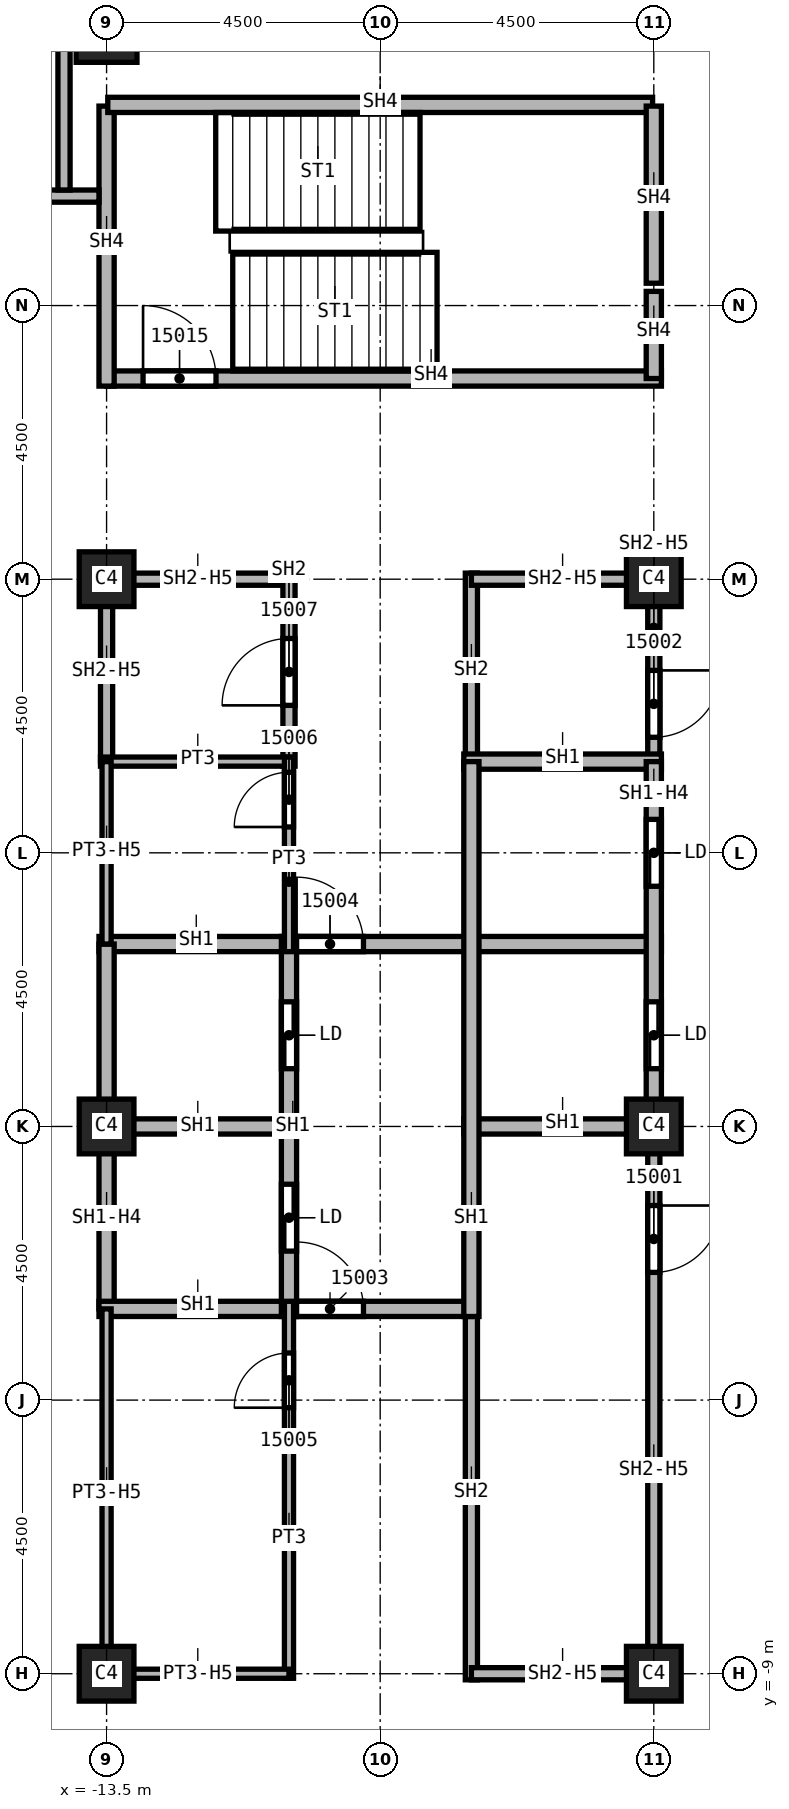
"""IFC4 building model, lengths in metres.
Left out: names, types, materials, properties, quantities, classifications, styles, units other than length and angle.
Written with IfcOpenShell. Run it as: python <this file> out.ifc"""

import sys

from ifc_helpers import new_model, si_unit, direction, frame, frame_2d, origin, origin_2d, place, context, subcontext, project, spatial, rectangle, extrude, element, fill, save


model = new_model("IFC4")
c1 = context("Model", 3, precision=1e-05, world=origin(), true_north=direction((0.0, 1.0)))
c2 = subcontext(c1, "Body", "Model", "MODEL_VIEW")
j1 = project(units=[si_unit("LENGTHUNIT", "METRE"), si_unit("PLANEANGLEUNIT", "RADIAN")], contexts=[c1])
p1 = place(None, origin())
s1 = spatial("IfcSite", under=j1, at=p1, CompositionType="ELEMENT")
p2 = place(p1, origin())
s2 = spatial("IfcBuilding", under=s1, at=p2, CompositionType="ELEMENT")
p3 = place(p2, frame((0.0, 0.0, 228.0)))
s3 = spatial("IfcBuildingStorey", under=s2, at=p3, CompositionType="ELEMENT", Elevation=228.0)
p4 = place(p3, frame((-13.5, 18.0, 0.0), z_axis=(0.0, 0.0, 1.0), x_axis=(1.0, 0.0, 0.0)))
e1 = element("IfcColumn", 1, at=p4, inside=s3, PredefinedType="COLUMN", context=c2, shape_type="SweptSolid", body=[
    extrude(rectangle(XDim=1.0, YDim=1.0, at=origin_2d()), origin(), (0.0, 0.0, 1.0), 3.72),
])
for number, where, z_axis, x_axis in (
    (2, (-4.5, 0.0, 0.0), (0.0, 0.0, 1.0), (1.0, 0.0, 0.0)),
    (3, (-4.5, 9.0, 0.0), (0.0, 0.0, 1.0), (1.0, 0.0, 0.0)),
    (4, (-4.5, -9.0, 0.0), (0.0, 0.0, 1.0), (1.0, 0.0, 0.0)),
    (5, (-13.5, 0.0, 0.0), (0.0, 0.0, 1.0), (1.0, 0.0, 0.0)),
    (6, (-13.5, 9.0, 0.0), (0.0, 0.0, 1.0), (1.0, 0.0, 0.0)),
    (7, (-13.5, -9.0, 0.0), (0.0, 0.0, 1.0), (1.0, 0.0, 0.0)),
):
    element("IfcColumn", number, at=place(p3, frame(where, z_axis=z_axis, x_axis=x_axis)), inside=s3, PredefinedType="COLUMN", context=c2, shape_type="SweptSolid", body=[
        extrude(rectangle(XDim=0.9, YDim=0.9, at=origin_2d()), origin(), (0.0, 0.0, 1.0), 3.72),
    ])
p5 = place(p3, frame((-13.5, 6.0, 0.0), z_axis=(0.0, 0.0, 1.0), x_axis=(0.0, 1.0, 0.0)))
e8 = element("IfcWall", 8, at=p5, inside=s3, PredefinedType="SOLIDWALL", context=c2, shape_type="SweptSolid", body=[
    extrude(rectangle(XDim=3.1, YDim=0.2, at=frame_2d((1.55, 0.0))), origin(), (0.0, 0.0, 1.0), 2.958),
])
p6 = place(p3, frame((-13.5, 9.0, 0.0), z_axis=(0.0, 0.0, 1.0), x_axis=(1.0, 0.0, 0.0)))
e9 = element("IfcWall", 9, at=p6, inside=s3, PredefinedType="SOLIDWALL", context=c2, shape_type="SweptSolid", body=[
    extrude(rectangle(XDim=3.0, YDim=0.2, at=frame_2d((1.5, 0.0))), origin(), (0.0, 0.0, 1.0), 2.958),
])
p7 = place(p3, frame((-10.5, 5.925, 0.0), z_axis=(0.0, 0.0, 1.0), x_axis=(0.0, 1.0, 0.0)))
e10 = element("IfcWall", 10, at=p7, inside=s3, PredefinedType="SOLIDWALL", context=c2, shape_type="SweptSolid", body=[
    extrude(rectangle(XDim=3.175, YDim=0.2, at=frame_2d((1.587, 0.0))), origin(), (0.0, 0.0, 1.0), 3.72),
])
p8 = place(p7, frame((1.0, 0.0, 0.0)))
e11 = element("IfcOpeningElement", 11, at=p8, cuts=e10, PredefinedType="OPENING", context=c2, shape_type="SweptSolid", body=[
    extrude(rectangle(XDim=1.1, YDim=2.1, at=frame_2d((0.55, 1.05))), frame((0.0, 0.1, 0.0), z_axis=(0.0, -1.0, 0.0), x_axis=(1.0, 0.0, 0.0)), (0.0, 0.0, 1.0), 0.2),
])
p9 = place(p3, frame((-7.5, -9.1, 0.0), z_axis=(0.0, 0.0, 1.0), x_axis=(0.0, 1.0, 0.0)))
e12 = element("IfcWall", 12, at=p9, inside=s3, PredefinedType="SOLIDWALL", context=c2, shape_type="SweptSolid", body=[
    extrude(rectangle(XDim=6.225, YDim=0.2, at=frame_2d((3.113, 0.0))), origin(), (0.0, 0.0, 1.0), 3.72),
])
p10 = place(p3, frame((-7.5, 6.0, 0.0), z_axis=(0.0, 0.0, 1.0), x_axis=(0.0, 1.0, 0.0)))
e13 = element("IfcWall", 13, at=p10, inside=s3, PredefinedType="SOLIDWALL", context=c2, shape_type="SweptSolid", body=[
    extrude(rectangle(XDim=3.1, YDim=0.2, at=frame_2d((1.55, 0.0))), origin(), (0.0, 0.0, 1.0), 3.72),
])
for number, where, z_axis, x_axis in (
    (14, (-7.5, 9.0, 0.0), (0.0, 0.0, 1.0), (1.0, 0.0, 0.0)),
    (15, (-4.5, -9.0, 0.0), (0.0, 0.0, 1.0), (-1.0, 0.0, 0.0)),
):
    element("IfcWall", number, at=place(p3, frame(where, z_axis=z_axis, x_axis=x_axis)), inside=s3, PredefinedType="SOLIDWALL", context=c2, shape_type="SweptSolid", body=[
        extrude(rectangle(XDim=3.0, YDim=0.2, at=frame_2d((1.5, 0.0))), origin(), (0.0, 0.0, 1.0), 2.958),
    ])
p11 = place(p3, frame((-4.5, 0.0, 0.0), z_axis=(0.0, 0.0, 1.0), x_axis=(0.0, -1.0, 0.0)))
e16 = element("IfcWall", 16, at=p11, inside=s3, PredefinedType="SOLIDWALL", context=c2, shape_type="SweptSolid", body=[
    extrude(rectangle(XDim=9.1, YDim=0.2, at=frame_2d((4.55, 0.0))), origin(), (0.0, 0.0, 1.0), 2.958),
])
p12 = place(p11, frame((1.3, 0.0, 0.0)))
e17 = element("IfcOpeningElement", 17, at=p12, cuts=e16, PredefinedType="OPENING", context=c2, shape_type="SweptSolid", body=[
    extrude(rectangle(XDim=1.1, YDim=2.1, at=frame_2d((0.55, 1.05))), frame((0.0, 0.1, 0.0), z_axis=(0.0, -1.0, 0.0), x_axis=(1.0, 0.0, 0.0)), (0.0, 0.0, 1.0), 0.2),
])
p13 = place(p3, frame((-4.5, 9.1, 0.0), z_axis=(0.0, 0.0, 1.0), x_axis=(0.0, -1.0, 0.0)))
e18 = element("IfcWall", 18, at=p13, inside=s3, PredefinedType="SOLIDWALL", context=c2, shape_type="SweptSolid", body=[
    extrude(rectangle(XDim=3.1, YDim=0.2, at=frame_2d((1.55, 0.0))), origin(), (0.0, 0.0, 1.0), 2.958),
])
p14 = place(p13, frame((1.6, 0.0, 0.0)))
e19 = element("IfcOpeningElement", 19, at=p14, cuts=e18, PredefinedType="OPENING", context=c2, shape_type="SweptSolid", body=[
    extrude(rectangle(XDim=1.1, YDim=2.1, at=frame_2d((0.55, 1.05))), frame((0.0, 0.1, 0.0), z_axis=(0.0, -1.0, 0.0), x_axis=(1.0, 0.0, 0.0)), (0.0, 0.0, 1.0), 0.2),
])
p15 = place(p3, frame((-13.625, 0.0, 0.0), z_axis=(0.0, 0.0, 1.0), x_axis=(1.0, 0.0, 0.0)))
e20 = element("IfcWall", 20, at=p15, inside=s3, PredefinedType="SOLIDWALL", context=c2, shape_type="SweptSolid", body=[
    extrude(rectangle(XDim=3.125, YDim=0.25, at=frame_2d((1.562, 0.0))), origin(), (0.0, 0.0, 1.0), 3.72),
])
p16 = place(p3, frame((-13.625, 3.0, 0.0), z_axis=(0.0, 0.0, 1.0), x_axis=(1.0, 0.0, 0.0)))
e21 = element("IfcWall", 21, at=p16, inside=s3, PredefinedType="SOLIDWALL", context=c2, shape_type="SweptSolid", body=[
    extrude(rectangle(XDim=9.25, YDim=0.25, at=frame_2d((4.625, 0.0))), origin(), (0.0, 0.0, 1.0), 3.72),
])
p17 = place(p16, frame((3.25, 0.0, 0.0)))
e22 = element("IfcOpeningElement", 22, at=p17, cuts=e21, PredefinedType="OPENING", context=c2, shape_type="SweptSolid", body=[
    extrude(rectangle(XDim=1.1, YDim=2.1, at=frame_2d((0.55, 1.05))), frame((0.0, 0.125, 0.0), z_axis=(0.0, -1.0, 0.0), x_axis=(1.0, 0.0, 0.0)), (0.0, 0.0, 1.0), 0.25),
])
p18 = place(p3, frame((-13.5, -3.0, 0.0), z_axis=(0.0, 0.0, 1.0), x_axis=(0.0, 1.0, 0.0)))
e23 = element("IfcWall", 23, at=p18, inside=s3, PredefinedType="SOLIDWALL", context=c2, shape_type="SweptSolid", body=[
    extrude(rectangle(XDim=6.0, YDim=0.25, at=frame_2d((3.0, 0.0))), origin(), (0.0, 0.0, 1.0), 2.958),
])
p19 = place(p3, frame((-13.625, -3.0, 0.0), z_axis=(0.0, 0.0, 1.0), x_axis=(1.0, 0.0, 0.0)))
e24 = element("IfcWall", 24, at=p19, inside=s3, PredefinedType="SOLIDWALL", context=c2, shape_type="SweptSolid", body=[
    extrude(rectangle(XDim=6.125, YDim=0.25, at=frame_2d((3.062, 0.0))), origin(), (0.0, 0.0, 1.0), 3.72),
])
p20 = place(p19, frame((3.25, 0.0, 0.0)))
e25 = element("IfcOpeningElement", 25, at=p20, cuts=e24, PredefinedType="OPENING", context=c2, shape_type="SweptSolid", body=[
    extrude(rectangle(XDim=1.1, YDim=2.1, at=frame_2d((0.55, 1.05))), frame((0.0, 0.125, 0.0), z_axis=(0.0, -1.0, 0.0), x_axis=(1.0, 0.0, 0.0)), (0.0, 0.0, 1.0), 0.25),
])
p21 = place(p3, frame((-10.5, -3.125, 0.0), z_axis=(0.0, 0.0, 1.0), x_axis=(0.0, 1.0, 0.0)))
e26 = element("IfcWall", 26, at=p21, inside=s3, PredefinedType="SOLIDWALL", context=c2, shape_type="SweptSolid", body=[
    extrude(rectangle(XDim=6.25, YDim=0.25, at=frame_2d((3.125, 0.0))), origin(), (0.0, 0.0, 1.0), 3.72),
])
p22 = place(p21, frame((1.075, 0.0, 0.0)))
e27 = element("IfcOpeningElement", 27, at=p22, cuts=e26, PredefinedType="OPENING", context=c2, shape_type="SweptSolid", body=[
    extrude(rectangle(XDim=1.1, YDim=2.1, at=frame_2d((0.55, 1.05))), frame((0.0, 0.125, 0.0), z_axis=(0.0, -1.0, 0.0), x_axis=(1.0, 0.0, 0.0)), (0.0, 0.0, 1.0), 0.25),
])
p23 = place(p21, frame((4.075, 0.0, 0.0)))
e28 = element("IfcOpeningElement", 28, at=p23, cuts=e26, PredefinedType="OPENING", context=c2, shape_type="SweptSolid", body=[
    extrude(rectangle(XDim=1.1, YDim=2.1, at=frame_2d((0.55, 1.05))), frame((0.0, 0.125, 0.0), z_axis=(0.0, -1.0, 0.0), x_axis=(1.0, 0.0, 0.0)), (0.0, 0.0, 1.0), 0.25),
])
for number, where, z_axis, x_axis in (
    (29, (-7.625, 0.0, 0.0), (0.0, 0.0, 1.0), (1.0, 0.0, 0.0)),
    (30, (-7.625, 6.0, 0.0), (0.0, 0.0, 1.0), (1.0, 0.0, 0.0)),
):
    element("IfcWall", number, at=place(p3, frame(where, z_axis=z_axis, x_axis=x_axis)), inside=s3, PredefinedType="SOLIDWALL", context=c2, shape_type="SweptSolid", body=[
        extrude(rectangle(XDim=3.25, YDim=0.25, at=frame_2d((1.625, 0.0))), origin(), (0.0, 0.0, 1.0), 3.72),
    ])
p24 = place(p3, frame((-7.5, -3.125, 0.0), z_axis=(0.0, 0.0, 1.0), x_axis=(0.0, 1.0, 0.0)))
e31 = element("IfcWall", 31, at=p24, inside=s3, PredefinedType="SOLIDWALL", context=c2, shape_type="SweptSolid", body=[
    extrude(rectangle(XDim=9.125, YDim=0.25, at=frame_2d((4.562, 0.0))), origin(), (0.0, 0.0, 1.0), 3.72),
])
p25 = place(p3, frame((-4.5, 6.0, 0.0), z_axis=(0.0, 0.0, 1.0), x_axis=(0.0, -1.0, 0.0)))
e32 = element("IfcWall", 32, at=p25, inside=s3, PredefinedType="SOLIDWALL", context=c2, shape_type="SweptSolid", body=[
    extrude(rectangle(XDim=6.0, YDim=0.25, at=frame_2d((3.0, 0.0))), origin(), (0.0, 0.0, 1.0), 2.958),
])
p26 = place(p25, frame((3.95, 0.0, 0.0)))
e33 = element("IfcOpeningElement", 33, at=p26, cuts=e32, PredefinedType="OPENING", context=c2, shape_type="SweptSolid", body=[
    extrude(rectangle(XDim=1.1, YDim=2.1, at=frame_2d((0.55, 1.05))), frame((0.0, 0.125, 0.0), z_axis=(0.0, -1.0, 0.0), x_axis=(1.0, 0.0, 0.0)), (0.0, 0.0, 1.0), 0.25),
])
p27 = place(p25, frame((0.95, 0.0, 0.0)))
e34 = element("IfcOpeningElement", 34, at=p27, cuts=e32, PredefinedType="OPENING", context=c2, shape_type="SweptSolid", body=[
    extrude(rectangle(XDim=1.1, YDim=2.1, at=frame_2d((0.55, 1.05))), frame((0.0, 0.125, 0.0), z_axis=(0.0, -1.0, 0.0), x_axis=(1.0, 0.0, 0.0)), (0.0, 0.0, 1.0), 0.25),
])
p28 = place(p3, frame((-13.5, 12.3, 0.0), z_axis=(0.0, 0.0, 1.0), x_axis=(1.0, 0.0, 0.0)))
e35 = element("IfcWall", 35, at=p28, inside=s3, PredefinedType="SOLIDWALL", context=c2, shape_type="SweptSolid", body=[
    extrude(rectangle(XDim=9.125, YDim=0.25, at=frame_2d((4.562, 0.0))), origin(), (0.0, 0.0, 1.0), 3.72),
])
p29 = place(p28, frame((0.6, 0.0, 0.0)))
e36 = element("IfcOpeningElement", 36, at=p29, cuts=e35, PredefinedType="OPENING", context=c2, shape_type="SweptSolid", body=[
    extrude(rectangle(XDim=1.2, YDim=2.1, at=frame_2d((0.6, 1.05))), frame((0.0, 0.125, 0.0), z_axis=(0.0, -1.0, 0.0), x_axis=(1.0, 0.0, 0.0)), (0.0, 0.0, 1.0), 0.25),
])
p30 = place(p3, frame((-13.5, 16.78, 0.0), z_axis=(0.0, 0.0, 1.0), x_axis=(0.0, -1.0, 0.0)))
e37 = element("IfcWall", 37, at=p30, inside=s3, PredefinedType="SOLIDWALL", context=c2, shape_type="SweptSolid", body=[
    extrude(rectangle(XDim=4.605, YDim=0.25, at=frame_2d((2.302, 0.0))), origin(), (0.0, 0.0, 1.0), 3.72),
])
p31 = place(p3, frame((-13.48, 16.8, 0.0), z_axis=(0.0, 0.0, 1.0), x_axis=(1.0, 0.0, 0.0)))
e38 = element("IfcWall", 38, at=p31, inside=s3, PredefinedType="SOLIDWALL", context=c2, shape_type="SweptSolid", body=[
    extrude(rectangle(XDim=8.96, YDim=0.25, at=frame_2d((4.48, 0.0))), origin(), (0.0, 0.0, 1.0), 3.72),
])
p32 = place(p3, frame((-4.5, 13.733, 0.0), z_axis=(0.0, 0.0, 1.0), x_axis=(0.0, -1.0, 0.0)))
e39 = element("IfcWall", 39, at=p32, inside=s3, PredefinedType="SOLIDWALL", context=c2, shape_type="SweptSolid", body=[
    extrude(rectangle(XDim=1.433, YDim=0.25, at=frame_2d((0.716, 0.0))), origin(), (0.0, 0.0, 1.0), 3.72),
])
p33 = place(p3, frame((-4.5, 16.78, 0.0), z_axis=(0.0, 0.0, 1.0), x_axis=(0.0, -1.0, 0.0)))
e40 = element("IfcWall", 40, at=p33, inside=s3, PredefinedType="SOLIDWALL", context=c2, shape_type="SweptSolid", body=[
    extrude(rectangle(XDim=2.913, YDim=0.25, at=frame_2d((1.457, 0.0))), origin(), (0.0, 0.0, 1.0), 3.72),
])
p34 = place(p3, frame((-13.6, 6.0, 0.0), z_axis=(0.0, 0.0, 1.0), x_axis=(1.0, 0.0, 0.0)))
e41 = element("IfcWall", 41, at=p34, inside=s3, PredefinedType="PARTITIONING", context=c2, shape_type="SweptSolid", body=[
    extrude(rectangle(XDim=3.1, YDim=0.15, at=frame_2d((1.55, 0.0))), origin(), (0.0, 0.0, 1.0), 3.72),
])
p35 = place(p3, frame((-13.5, -9.075, 0.0), z_axis=(0.0, 0.0, 1.0), x_axis=(0.0, 1.0, 0.0)))
e42 = element("IfcWall", 42, at=p35, inside=s3, PredefinedType="PARTITIONING", context=c2, shape_type="SweptSolid", body=[
    extrude(rectangle(XDim=6.075, YDim=0.15, at=frame_2d((3.038, 0.0))), origin(), (0.0, 0.0, 1.0), 2.958),
])
p36 = place(p3, frame((-13.5, 3.0, 0.0), z_axis=(0.0, 0.0, 1.0), x_axis=(0.0, 1.0, 0.0)))
e43 = element("IfcWall", 43, at=p36, inside=s3, PredefinedType="PARTITIONING", context=c2, shape_type="SweptSolid", body=[
    extrude(rectangle(XDim=3.0, YDim=0.15, at=frame_2d((1.5, 0.0))), origin(), (0.0, 0.0, 1.0), 2.958),
])
p37 = place(p3, frame((-10.5, -9.075, 0.0), z_axis=(0.0, 0.0, 1.0), x_axis=(0.0, 1.0, 0.0)))
e44 = element("IfcWall", 44, at=p37, inside=s3, PredefinedType="PARTITIONING", context=c2, shape_type="SweptSolid", body=[
    extrude(rectangle(XDim=6.2, YDim=0.15, at=frame_2d((3.1, 0.0))), origin(), (0.0, 0.0, 1.0), 3.72),
])
p38 = place(p37, frame((4.45, 0.0, 0.0)))
e45 = element("IfcOpeningElement", 45, at=p38, cuts=e44, PredefinedType="OPENING", context=c2, shape_type="SweptSolid", body=[
    extrude(rectangle(XDim=0.9, YDim=2.1, at=frame_2d((0.45, 1.05))), frame((0.0, 0.075, 0.0), z_axis=(0.0, -1.0, 0.0), x_axis=(1.0, 0.0, 0.0)), (0.0, 0.0, 1.0), 0.15),
])
p39 = place(p3, frame((-10.5, -9.0, 0.0), z_axis=(0.0, 0.0, 1.0), x_axis=(-1.0, 0.0, 0.0)))
e46 = element("IfcWall", 46, at=p39, inside=s3, PredefinedType="PARTITIONING", context=c2, shape_type="SweptSolid", body=[
    extrude(rectangle(XDim=3.0, YDim=0.15, at=frame_2d((1.5, 0.0))), origin(), (0.0, 0.0, 1.0), 2.958),
])
p40 = place(p3, frame((-10.5, 2.875, 0.0), z_axis=(0.0, 0.0, 1.0), x_axis=(0.0, 1.0, 0.0)))
e47 = element("IfcWall", 47, at=p40, inside=s3, PredefinedType="PARTITIONING", context=c2, shape_type="SweptSolid", body=[
    extrude(rectangle(XDim=3.2, YDim=0.15, at=frame_2d((1.6, 0.0))), origin(), (0.0, 0.0, 1.0), 3.72),
])
p41 = place(p40, frame((2.05, 0.0, 0.0)))
e48 = element("IfcOpeningElement", 48, at=p41, cuts=e47, PredefinedType="OPENING", context=c2, shape_type="SweptSolid", body=[
    extrude(rectangle(XDim=0.9, YDim=2.1, at=frame_2d((0.45, 1.05))), frame((0.0, 0.075, 0.0), z_axis=(0.0, -1.0, 0.0), x_axis=(1.0, 0.0, 0.0)), (0.0, 0.0, 1.0), 0.15),
])
p42 = place(p3, frame((-21.9, 15.3, 0.0), z_axis=(0.0, 0.0, 1.0), x_axis=(1.0, 0.0, 0.0)))
e49 = element("IfcWall", 49, at=p42, inside=s3, PredefinedType="SOLIDWALL", context=c2, shape_type="SweptSolid", body=[
    extrude(rectangle(XDim=8.275, YDim=0.2, at=frame_2d((4.137, 0.0))), origin(), (0.0, 0.0, 1.0), 3.72),
])
p43 = place(p42, frame((4.8, 0.0, 0.0)))
e50 = element("IfcOpeningElement", 50, at=p43, cuts=e49, PredefinedType="OPENING", context=c2, shape_type="SweptSolid", body=[
    extrude(rectangle(XDim=1.2, YDim=2.1, at=frame_2d((0.6, 1.05))), frame((0.0, 0.1, 0.0), z_axis=(0.0, -1.0, 0.0), x_axis=(1.0, 0.0, 0.0)), (0.0, 0.0, 1.0), 0.2),
])
p44 = place(p3, frame((-14.2, 15.4, 0.0), z_axis=(0.0, 0.0, 1.0), x_axis=(0.0, 1.0, 0.0)))
e51 = element("IfcWall", 51, at=p44, inside=s3, PredefinedType="SOLIDWALL", context=c2, shape_type="SweptSolid", body=[
    extrude(rectangle(XDim=5.9, YDim=0.2, at=frame_2d((2.95, 0.0))), origin(), (0.0, 0.0, 1.0), 3.72),
])
p45 = place(p12, origin())
e52 = element("IfcDoor", 52, at=p45, inside=s3, OperationType="SINGLE_SWING_RIGHT", PredefinedType="DOOR", context=c2, shape_type="SweptSolid", body=[
    extrude(rectangle(XDim=1.1, YDim=2.1, at=frame_2d((0.55, 1.05))), frame((0.0, 0.025, 0.0), z_axis=(0.0, -1.0, 0.0), x_axis=(1.0, 0.0, 0.0)), (0.0, 0.0, 1.0), 0.05),
])
fill(e17, e52)
p46 = place(p14, origin())
e53 = element("IfcDoor", 53, at=p46, inside=s3, OperationType="SINGLE_SWING_LEFT", PredefinedType="DOOR", context=c2, shape_type="SweptSolid", body=[
    extrude(rectangle(XDim=1.1, YDim=2.1, at=frame_2d((0.55, 1.05))), frame((0.0, 0.025, 0.0), z_axis=(0.0, -1.0, 0.0), x_axis=(1.0, 0.0, 0.0)), (0.0, 0.0, 1.0), 0.05),
])
fill(e19, e53)
p47 = place(p20, origin())
e54 = element("IfcDoor", 54, at=p47, inside=s3, OperationType="SINGLE_SWING_RIGHT", PredefinedType="DOOR", context=c2, shape_type="SweptSolid", body=[
    extrude(rectangle(XDim=1.1, YDim=2.1, at=frame_2d((0.55, 1.05))), frame((0.0, 0.025, 0.0), z_axis=(0.0, -1.0, 0.0), x_axis=(1.0, 0.0, 0.0)), (0.0, 0.0, 1.0), 0.05),
])
fill(e25, e54)
p48 = place(p17, origin())
e55 = element("IfcDoor", 55, at=p48, inside=s3, OperationType="SINGLE_SWING_LEFT", PredefinedType="DOOR", context=c2, shape_type="SweptSolid", body=[
    extrude(rectangle(XDim=1.1, YDim=2.1, at=frame_2d((0.55, 1.05))), frame((0.0, 0.025, 0.0), z_axis=(0.0, -1.0, 0.0), x_axis=(1.0, 0.0, 0.0)), (0.0, 0.0, 1.0), 0.05),
])
fill(e22, e55)
p49 = place(p38, origin())
e56 = element("IfcDoor", 56, at=p49, inside=s3, OperationType="SINGLE_SWING_RIGHT", PredefinedType="DOOR", context=c2, shape_type="SweptSolid", body=[
    extrude(rectangle(XDim=0.9, YDim=2.1, at=frame_2d((0.45, 1.05))), frame((0.0, 0.025, 0.0), z_axis=(0.0, -1.0, 0.0), x_axis=(1.0, 0.0, 0.0)), (0.0, 0.0, 1.0), 0.05),
])
fill(e45, e56)
p50 = place(p41, origin())
e57 = element("IfcDoor", 57, at=p50, inside=s3, OperationType="SINGLE_SWING_LEFT", PredefinedType="DOOR", context=c2, shape_type="SweptSolid", body=[
    extrude(rectangle(XDim=0.9, YDim=2.1, at=frame_2d((0.45, 1.05))), frame((0.0, 0.025, 0.0), z_axis=(0.0, -1.0, 0.0), x_axis=(1.0, 0.0, 0.0)), (0.0, 0.0, 1.0), 0.05),
])
fill(e48, e57)
p51 = place(p8, origin())
e58 = element("IfcDoor", 58, at=p51, inside=s3, OperationType="SINGLE_SWING_RIGHT", PredefinedType="DOOR", context=c2, shape_type="SweptSolid", body=[
    extrude(rectangle(XDim=1.1, YDim=2.1, at=frame_2d((0.55, 1.05))), frame((0.0, 0.025, 0.0), z_axis=(0.0, -1.0, 0.0), x_axis=(1.0, 0.0, 0.0)), (0.0, 0.0, 1.0), 0.05),
])
fill(e11, e58)
p52 = place(p29, origin())
e59 = element("IfcDoor", 59, at=p52, inside=s3, OperationType="SINGLE_SWING_RIGHT", PredefinedType="DOOR", context=c2, shape_type="SweptSolid", body=[
    extrude(rectangle(XDim=1.2, YDim=2.1, at=frame_2d((0.6, 1.05))), frame((0.0, 0.025, 0.0), z_axis=(0.0, -1.0, 0.0), x_axis=(1.0, 0.0, 0.0)), (0.0, 0.0, 1.0), 0.05),
])
fill(e36, e59)
p53 = place(p26, origin())
e60 = element("IfcDoor", 60, at=p53, inside=s3, OperationType="SLIDING_TO_LEFT", PredefinedType="DOOR", context=c2, shape_type="SweptSolid", body=[
    extrude(rectangle(XDim=1.1, YDim=2.1, at=frame_2d((0.55, 1.05))), frame((0.0, 0.025, 0.0), z_axis=(0.0, -1.0, 0.0), x_axis=(1.0, 0.0, 0.0)), (0.0, 0.0, 1.0), 0.05),
])
fill(e33, e60)
p54 = place(p27, origin())
e61 = element("IfcDoor", 61, at=p54, inside=s3, OperationType="SLIDING_TO_LEFT", PredefinedType="DOOR", context=c2, shape_type="SweptSolid", body=[
    extrude(rectangle(XDim=1.1, YDim=2.1, at=frame_2d((0.55, 1.05))), frame((0.0, 0.025, 0.0), z_axis=(0.0, -1.0, 0.0), x_axis=(1.0, 0.0, 0.0)), (0.0, 0.0, 1.0), 0.05),
])
fill(e34, e61)
p55 = place(p22, origin())
e62 = element("IfcDoor", 62, at=p55, inside=s3, OperationType="SLIDING_TO_LEFT", PredefinedType="DOOR", context=c2, shape_type="SweptSolid", body=[
    extrude(rectangle(XDim=1.1, YDim=2.1, at=frame_2d((0.55, 1.05))), frame((0.0, 0.025, 0.0), z_axis=(0.0, -1.0, 0.0), x_axis=(1.0, 0.0, 0.0)), (0.0, 0.0, 1.0), 0.05),
])
fill(e27, e62)
p56 = place(p23, origin())
e63 = element("IfcDoor", 63, at=p56, inside=s3, OperationType="SLIDING_TO_LEFT", PredefinedType="DOOR", context=c2, shape_type="SweptSolid", body=[
    extrude(rectangle(XDim=1.1, YDim=2.1, at=frame_2d((0.55, 1.05))), frame((0.0, 0.025, 0.0), z_axis=(0.0, -1.0, 0.0), x_axis=(1.0, 0.0, 0.0)), (0.0, 0.0, 1.0), 0.05),
])
fill(e28, e63)
save(model, sys.argv[1])
